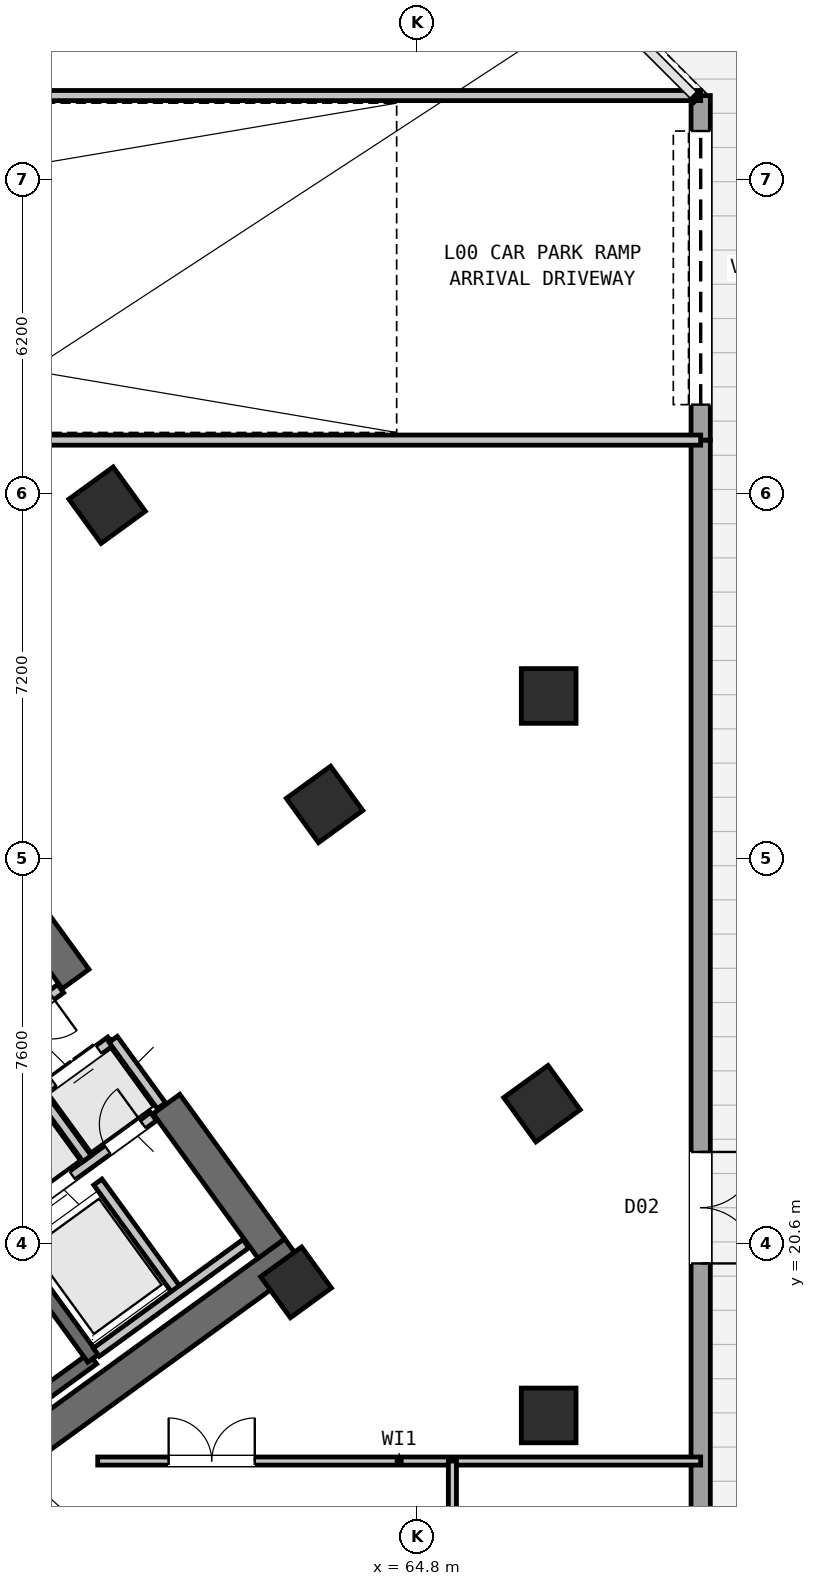
"""IFC4 building model, lengths in metres.
Left out: names, types, materials, properties, quantities, classifications, styles, units other than length and angle.
Written with IfcOpenShell. Run it as: python <this file> out.ifc"""

import sys

from ifc_helpers import new_model, si_unit, direction, frame, frame_2d, origin, origin_2d, place, context, subcontext, project, spatial, rectangle, hollow_rectangle, extrude, source, transform, mapped, element, fill, save


model = new_model("IFC4")
c1 = context("Model", 3, precision=1e-05, world=origin(), true_north=direction((0.0, 1.0)))
c2 = subcontext(c1, "Body", "Model", "MODEL_VIEW")
j1 = project(units=[si_unit("LENGTHUNIT", "METRE"), si_unit("PLANEANGLEUNIT", "RADIAN")], contexts=[c1])
p1 = place(None, origin())
s1 = spatial("IfcSite", under=j1, at=p1, CompositionType="ELEMENT")
p2 = place(p1, origin())
s2 = spatial("IfcBuilding", under=s1, at=p2, CompositionType="ELEMENT")
p3 = place(p2, origin())
s3 = spatial("IfcBuildingStorey", under=s2, at=p3, CompositionType="ELEMENT", Elevation=0.0)
p4 = place(p3, frame((52.318, 13.11, 0.0), z_axis=(0.0, 0.0, 1.0), x_axis=(0.809019445368, 0.587781878776, 0.0)))
e1 = element("IfcWall", 1, at=p4, inside=s3, PredefinedType="SHEAR", context=c2, shape_type="SweptSolid", body=[
    extrude(rectangle(XDim=12.44, YDim=0.65, at=frame_2d((6.22, 0.0))), origin(), (0.0, 0.0, 1.0), 5.05),
])
p5 = place(p3, frame((61.929, 20.494, 0.0), z_axis=(0.0, 0.0, 1.0), x_axis=(-0.58782982593, 0.808984607855, 0.0)))
e2 = element("IfcWall", 2, at=p5, inside=s3, PredefinedType="SHEAR", context=c2, shape_type="SweptSolid", body=[
    extrude(rectangle(XDim=3.525, YDim=0.65, at=frame_2d((1.762, 0.0))), origin(), (0.0, 0.0, 1.0), 5.05),
])
p6 = place(p3, frame((58.064, 25.813, 0.0), z_axis=(0.0, 0.0, 1.0), x_axis=(-0.58777996584, 0.809020835181, 0.0)))
e3 = element("IfcWall", 3, at=p6, inside=s3, PredefinedType="SHEAR", context=c2, shape_type="SweptSolid", body=[
    extrude(rectangle(XDim=6.375, YDim=0.65, at=frame_2d((3.188, 0.0))), origin(), (0.0, 0.0, 1.0), 5.05),
])
m1 = source(origin(), c2, "Body", "SweptSolid", [
    extrude(hollow_rectangle(XDim=1.08, YDim=1.08, WallThickness=0.04, at=origin_2d()), origin(), (0.0, 0.0, 1.0), 5.4),
])
for number, where, z_axis, x_axis in (
    (4, (67.4, 17.2, 0.0), (0.0, 0.0, 1.0), (1.0, 0.0, 0.0)),
    (5, (67.4, 31.4, 0.0), (0.0, 0.0, 1.0), (1.0, 0.0, 0.0)),
    (6, (67.268, 23.354, 0.0), (0.0, 0.0, 1.0), (0.809, 0.588, 0.0)),
    (7, (62.977, 29.259, 0.0), (0.0, 0.0, 1.0), (0.809, 0.588, 0.0)),
    (8, (58.686, 35.165, 0.0), (0.0, 0.0, 1.0), (0.809, 0.588, 0.0)),
):
    element("IfcColumn", number, at=place(p3, frame(where, z_axis=z_axis, x_axis=x_axis)), inside=s3, PredefinedType="COLUMN", context=c2, shape_type="MappedRepresentation", body=[
        mapped(m1, transform((0.0, 0.0, 0.0), scale=1.0)),
    ])
m2 = source(origin(), c2, "Body", "SweptSolid", [
    extrude(hollow_rectangle(XDim=1.0, YDim=1.0, WallThickness=0.04, at=origin_2d()), origin(), (0.0, 0.0, 1.0), 5.4),
])
p7 = place(p3, frame((62.414, 19.827, 0.0), z_axis=(0.0, 0.0, 1.0), x_axis=(0.809016994375, 0.587785252292, 0.0)))
e9 = element("IfcColumn", 9, at=p7, inside=s3, PredefinedType="COLUMN", context=c2, shape_type="MappedRepresentation", body=[
    mapped(m2, transform((0.0, 0.0, 0.0), scale=1.0)),
])
p8 = place(p3, frame((70.4, 4.883, 0.0), z_axis=(0.0, 0.0, 1.0), x_axis=(0.0, 1.0, 0.0)))
e10 = element("IfcWall", 10, at=p8, inside=s3, PredefinedType="STANDARD", context=c2, shape_type="SweptSolid", body=[
    extrude(rectangle(XDim=31.567, YDim=0.38, at=frame_2d((15.784, 0.0))), origin(), (0.0, 0.0, 1.0), 5.05),
])
p9 = place(p8, frame((15.317, 0.0, 0.0)))
e11 = element("IfcOpeningElement", 11, at=p9, cuts=e10, PredefinedType="OPENING", context=c2, shape_type="SweptSolid", body=[
    extrude(rectangle(XDim=2.2, YDim=2.6, at=frame_2d((1.1, 1.3))), frame((0.0, 0.2, 0.0), z_axis=(0.0, -1.0, 0.0), x_axis=(1.0, 0.0, 0.0)), (0.0, 0.0, 1.0), 0.4),
])
p10 = place(p3, frame((70.4, 36.45, 0.0), z_axis=(0.0, 0.0, 1.0), x_axis=(0.0, 1.0, 0.0)))
e12 = element("IfcWall", 12, at=p10, inside=s3, PredefinedType="STANDARD", context=c2, shape_type="SweptSolid", body=[
    extrude(rectangle(XDim=6.8, YDim=0.38, at=frame_2d((3.4, 0.0))), origin(), (0.0, 0.0, 1.0), 5.05),
])
p11 = place(p10, frame((0.7, 0.0, 0.0)))
e13 = element("IfcOpeningElement", 13, at=p11, cuts=e12, PredefinedType="OPENING", context=c2, shape_type="SweptSolid", body=[
    extrude(rectangle(XDim=5.4, YDim=3.2, at=frame_2d((2.7, 1.6))), frame((0.0, 0.2, 0.0), z_axis=(0.0, -1.0, 0.0), x_axis=(1.0, 0.0, 0.0)), (0.0, 0.0, 1.0), 0.4),
])
p12 = place(p3, frame((52.472, 14.013, 0.0), z_axis=(0.0, 0.0, 1.0), x_axis=(0.809028366311, 0.587769599847, 0.0)))
e14 = element("IfcWall", 14, at=p12, inside=s3, PredefinedType="SHEAR", context=c2, shape_type="SweptSolid", body=[
    extrude(rectangle(XDim=7.33, YDim=0.26, at=frame_2d((3.665, 0.0))), origin(), (0.0, 0.0, 1.0), 5.05),
])
p13 = place(p3, frame((58.41, 18.327, 0.0), z_axis=(0.0, 0.0, 1.0), x_axis=(-0.58776738483, 0.809029975545, 0.0)))
e15 = element("IfcWall", 15, at=p13, inside=s3, PredefinedType="SHEAR", context=c2, shape_type="SweptSolid", body=[
    extrude(rectangle(XDim=3.16, YDim=0.26, at=frame_2d((1.58, 0.0))), origin(), (0.0, 0.0, 1.0), 5.05),
])
p14 = place(p3, frame((56.553, 20.884, 0.0), z_axis=(0.0, 0.0, 1.0), x_axis=(0.809035789462, 0.587759382205, 0.0)))
e16 = element("IfcWall", 16, at=p14, inside=s3, PredefinedType="STANDARD", context=c2, shape_type="SweptSolid", body=[
    extrude(rectangle(XDim=3.768, YDim=0.2, at=frame_2d((1.884, 0.0))), origin(), (0.0, 0.0, 1.0), 5.04),
])
p15 = place(p14, frame((0.69, 0.0, 0.0)))
e17 = element("IfcOpeningElement", 17, at=p15, cuts=e16, PredefinedType="OPENING", context=c2, shape_type="SweptSolid", body=[
    extrude(rectangle(XDim=1.1, YDim=2.15, at=frame_2d((0.55, 1.075))), frame((0.0, 0.11, 0.0), z_axis=(0.0, -1.0, 0.0), x_axis=(1.0, 0.0, 0.0)), (0.0, 0.0, 1.0), 0.22),
])
p16 = place(p14, frame((2.65, 0.0, 0.0)))
e18 = element("IfcOpeningElement", 18, at=p16, cuts=e16, PredefinedType="OPENING", context=c2, shape_type="SweptSolid", body=[
    extrude(rectangle(XDim=0.86, YDim=2.05, at=frame_2d((0.43, 1.025))), frame((0.0, 0.11, 0.0), z_axis=(0.0, -1.0, 0.0), x_axis=(1.0, 0.0, 0.0)), (0.0, 0.0, 1.0), 0.22),
])
p17 = place(p3, frame((54.421, 21.436, 0.0), z_axis=(0.0, 0.0, 1.0), x_axis=(0.809013710463, 0.587789772183, 0.0)))
e19 = element("IfcWall", 19, at=p17, inside=s3, PredefinedType="STANDARD", context=c2, shape_type="SweptSolid", body=[
    extrude(rectangle(XDim=5.36, YDim=0.2, at=frame_2d((2.68, 0.0))), origin(), (0.0, 0.0, 1.0), 5.04),
])
p18 = place(p17, frame((0.37, 0.0, 0.0)))
e20 = element("IfcOpeningElement", 20, at=p18, cuts=e19, PredefinedType="OPENING", context=c2, shape_type="SweptSolid", body=[
    extrude(rectangle(XDim=1.1, YDim=2.15, at=frame_2d((0.55, 1.075))), frame((0.0, 0.11, 0.0), z_axis=(0.0, -1.0, 0.0), x_axis=(1.0, 0.0, 0.0)), (0.0, 0.0, 1.0), 0.22),
])
p19 = place(p17, frame((2.17, 0.0, 0.0)))
e21 = element("IfcOpeningElement", 21, at=p19, cuts=e19, PredefinedType="OPENING", context=c2, shape_type="SweptSolid", body=[
    extrude(rectangle(XDim=1.1, YDim=2.15, at=frame_2d((0.55, 1.075))), frame((0.0, 0.11, 0.0), z_axis=(0.0, -1.0, 0.0), x_axis=(1.0, 0.0, 0.0)), (0.0, 0.0, 1.0), 0.22),
])
p20 = place(p17, frame((3.97, 0.0, 0.0)))
e22 = element("IfcOpeningElement", 22, at=p20, cuts=e19, PredefinedType="OPENING", context=c2, shape_type="SweptSolid", body=[
    extrude(rectangle(XDim=1.1, YDim=2.15, at=frame_2d((0.55, 1.075))), frame((0.0, 0.11, 0.0), z_axis=(0.0, -1.0, 0.0), x_axis=(1.0, 0.0, 0.0)), (0.0, 0.0, 1.0), 0.22),
])
p21 = place(p3, frame((58.29, 22.27, 0.0), z_axis=(0.0, 0.0, 1.0), x_axis=(-0.587840865826, 0.808976585857, 0.0)))
e23 = element("IfcWall", 23, at=p21, inside=s3, PredefinedType="STANDARD", context=c2, shape_type="SweptSolid", body=[
    extrude(rectangle(XDim=1.58, YDim=0.2, at=frame_2d((0.79, 0.0))), origin(), (0.0, 0.0, 1.0), 5.04),
])
p22 = place(p3, frame((59.758, 23.312, 0.0), z_axis=(0.0, 0.0, 1.0), x_axis=(-0.587875962906, 0.808951081486, 0.0)))
e24 = element("IfcWall", 24, at=p22, inside=s3, PredefinedType="STANDARD", context=c2, shape_type="SweptSolid", body=[
    extrude(rectangle(XDim=1.62, YDim=0.2, at=frame_2d((0.81, 0.0))), origin(), (0.0, 0.0, 1.0), 5.04),
])
p23 = place(p3, frame((60.067, 19.655, 0.0), z_axis=(0.0, 0.0, 1.0), x_axis=(-0.587800520745, 0.809005900975, 0.0)))
e25 = element("IfcWall", 25, at=p23, inside=s3, PredefinedType="STANDARD", context=c2, shape_type="SweptSolid", body=[
    extrude(rectangle(XDim=2.66, YDim=0.2, at=frame_2d((1.33, 0.0))), origin(), (0.0, 0.0, 1.0), 5.04),
])
p24 = place(p3, frame((58.472, 18.447, 0.0), z_axis=(0.0, 0.0, 1.0), x_axis=(0.809022487728, 0.587777691266, 0.0)))
e26 = element("IfcWall", 26, at=p24, inside=s3, PredefinedType="STANDARD", context=c2, shape_type="SweptSolid", body=[
    extrude(rectangle(XDim=3.648, YDim=0.2, at=frame_2d((1.824, 0.0))), origin(), (0.0, 0.0, 1.0), 5.04),
])
p25 = place(p3, frame((53.425, 22.468, 0.0), z_axis=(0.0, 0.0, 1.0), x_axis=(0.80902705128, 0.587771409902, 0.0)))
e27 = element("IfcWall", 27, at=p25, inside=s3, PredefinedType="STANDARD", context=c2, shape_type="SweptSolid", body=[
    extrude(rectangle(XDim=5.368, YDim=0.2, at=frame_2d((2.684, 0.0))), origin(), (0.0, 0.0, 1.0), 5.04),
])
p26 = place(p25, frame((4.28, 0.0, 0.0)))
e28 = element("IfcOpeningElement", 28, at=p26, cuts=e27, PredefinedType="OPENING", context=c2, shape_type="SweptSolid", body=[
    extrude(rectangle(XDim=0.86, YDim=2.05, at=frame_2d((0.43, 1.025))), frame((0.0, 0.11, 0.0), z_axis=(0.0, -1.0, 0.0), x_axis=(1.0, 0.0, 0.0)), (0.0, 0.0, 1.0), 0.22),
])
p27 = place(p25, frame((1.45, 0.0, 0.0)))
e29 = element("IfcOpeningElement", 29, at=p27, cuts=e27, PredefinedType="OPENING", context=c2, shape_type="SweptSolid", body=[
    extrude(rectangle(XDim=0.86, YDim=2.05, at=frame_2d((0.43, 1.025))), frame((0.0, 0.11, 0.0), z_axis=(0.0, -1.0, 0.0), x_axis=(1.0, 0.0, 0.0)), (0.0, 0.0, 1.0), 0.22),
])
p28 = place(p3, frame((25.85, 36.45, 0.0), z_axis=(0.0, 0.0, 1.0), x_axis=(1.0, 0.0, 0.0)))
e30 = element("IfcWall", 30, at=p28, inside=s3, PredefinedType="STANDARD", context=c2, shape_type="SweptSolid", body=[
    extrude(rectangle(XDim=44.55, YDim=0.2, at=frame_2d((22.275, 0.0))), origin(), (0.0, 0.0, 1.0), 5.04),
])
p29 = place(p3, frame((55.952, 43.25, 0.0), z_axis=(0.0, 0.0, 1.0), x_axis=(1.0, 0.0, 0.0)))
e31 = element("IfcWall", 31, at=p29, inside=s3, PredefinedType="STANDARD", context=c2, shape_type="SweptSolid", body=[
    extrude(rectangle(XDim=14.448, YDim=0.2, at=frame_2d((7.224, 0.0))), origin(), (0.0, 0.0, 1.0), 5.04),
])
p30 = place(p3, frame((58.5, 16.3, 0.0), z_axis=(0.0, 0.0, 1.0), x_axis=(1.0, 0.0, 0.0)))
e32 = element("IfcWall", 32, at=p30, inside=s3, PredefinedType="PARTITIONING", context=c2, shape_type="SweptSolid", body=[
    extrude(rectangle(XDim=11.9, YDim=0.16, at=frame_2d((5.95, 0.0))), origin(), (0.0, 0.0, 1.0), 5.04),
])
p31 = place(p30, frame((1.4, 0.0, 0.0)))
e33 = element("IfcOpeningElement", 33, at=p31, cuts=e32, PredefinedType="OPENING", context=c2, shape_type="SweptSolid", body=[
    extrude(rectangle(XDim=1.7, YDim=2.2, at=frame_2d((0.85, 1.1))), frame((0.0, 0.09, 0.0), z_axis=(0.0, -1.0, 0.0), x_axis=(1.0, 0.0, 0.0)), (0.0, 0.0, 1.0), 0.18),
])
p32 = place(p3, frame((65.5, 7.62, 0.0), z_axis=(0.0, 0.0, 1.0), x_axis=(0.0, 1.0, 0.0)))
e34 = element("IfcWall", 34, at=p32, inside=s3, PredefinedType="PARTITIONING", context=c2, shape_type="SweptSolid", body=[
    extrude(rectangle(XDim=8.68, YDim=0.16, at=frame_2d((4.34, 0.0))), origin(), (0.0, 0.0, 1.0), 5.04),
])
m3 = source(origin(), c2, "Body", "SweptSolid", [
    extrude(rectangle(XDim=2.2, YDim=2.6, at=frame_2d((1.1, 1.3))), frame((0.0, 0.025, 0.0), z_axis=(0.0, -1.0, 0.0), x_axis=(1.0, 0.0, 0.0)), (0.0, 0.0, 1.0), 0.05),
])
p33 = place(p9, frame((2.2, 0.0, 0.0), z_axis=(0.0, 0.0, 1.0), x_axis=(-1.0, 0.0, 0.0)))
e35 = element("IfcDoor", 35, at=p33, inside=s3, OperationType="DOUBLE_DOOR_SINGLE_SWING", PredefinedType="DOOR", context=c2, shape_type="MappedRepresentation", body=[
    mapped(m3, transform((0.0, 0.0, 0.0), scale=1.0)),
])
fill(e11, e35)
m4 = source(origin(), c2, "Body", "SweptSolid", [
    extrude(rectangle(XDim=5.4, YDim=3.2, at=frame_2d((2.7, 1.6))), frame((0.0, 0.025, 0.0), z_axis=(0.0, -1.0, 0.0), x_axis=(1.0, 0.0, 0.0)), (0.0, 0.0, 1.0), 0.05),
])
p34 = place(p11, origin())
e36 = element("IfcDoor", 36, at=p34, inside=s3, OperationType="ROLLINGUP", PredefinedType="GATE", context=c2, shape_type="MappedRepresentation", body=[
    mapped(m4, transform((0.0, 0.0, 0.0), scale=1.0)),
])
fill(e13, e36)
m5 = source(origin(), c2, "Body", "SweptSolid", [
    extrude(rectangle(XDim=1.1, YDim=2.15, at=frame_2d((0.55, 1.075))), frame((0.0, 0.025, 0.0), z_axis=(0.0, -1.0, 0.0), x_axis=(1.0, 0.0, 0.0)), (0.0, 0.0, 1.0), 0.05),
])
p35 = place(p20, origin())
e37 = element("IfcDoor", 37, at=p35, inside=s3, OperationType="DOUBLE_DOOR_SLIDING", PredefinedType="DOOR", context=c2, shape_type="MappedRepresentation", body=[
    mapped(m5, transform((0.0, 0.0, 0.0), scale=1.0)),
])
fill(e22, e37)
p36 = place(p15, origin())
e38 = element("IfcDoor", 38, at=p36, inside=s3, OperationType="DOUBLE_DOOR_SLIDING", PredefinedType="DOOR", context=c2, shape_type="MappedRepresentation", body=[
    mapped(m5, transform((0.0, 0.0, 0.0), scale=1.0)),
])
fill(e17, e38)
m6 = source(origin(), c2, "Body", "SweptSolid", [
    extrude(rectangle(XDim=0.86, YDim=2.05, at=frame_2d((0.43, 1.025))), frame((0.0, 0.025, 0.0), z_axis=(0.0, -1.0, 0.0), x_axis=(1.0, 0.0, 0.0)), (0.0, 0.0, 1.0), 0.05),
])
p37 = place(p16, origin())
e39 = element("IfcDoor", 39, at=p37, inside=s3, OperationType="SINGLE_SWING_RIGHT", PredefinedType="DOOR", context=c2, shape_type="MappedRepresentation", body=[
    mapped(m6, transform((0.0, 0.0, 0.0), scale=1.0)),
])
fill(e18, e39)
m7 = source(origin(), c2, "Body", "SweptSolid", [
    extrude(rectangle(XDim=1.7, YDim=2.2, at=frame_2d((0.85, 1.1))), frame((0.0, 0.025, 0.0), z_axis=(0.0, -1.0, 0.0), x_axis=(1.0, 0.0, 0.0)), (0.0, 0.0, 1.0), 0.05),
])
p38 = place(p31, origin())
e40 = element("IfcDoor", 40, at=p38, inside=s3, OperationType="DOUBLE_DOOR_SINGLE_SWING", PredefinedType="DOOR", context=c2, shape_type="MappedRepresentation", body=[
    mapped(m7, transform((0.0, 0.0, 0.0), scale=1.0)),
])
fill(e33, e40)
save(model, sys.argv[1])
